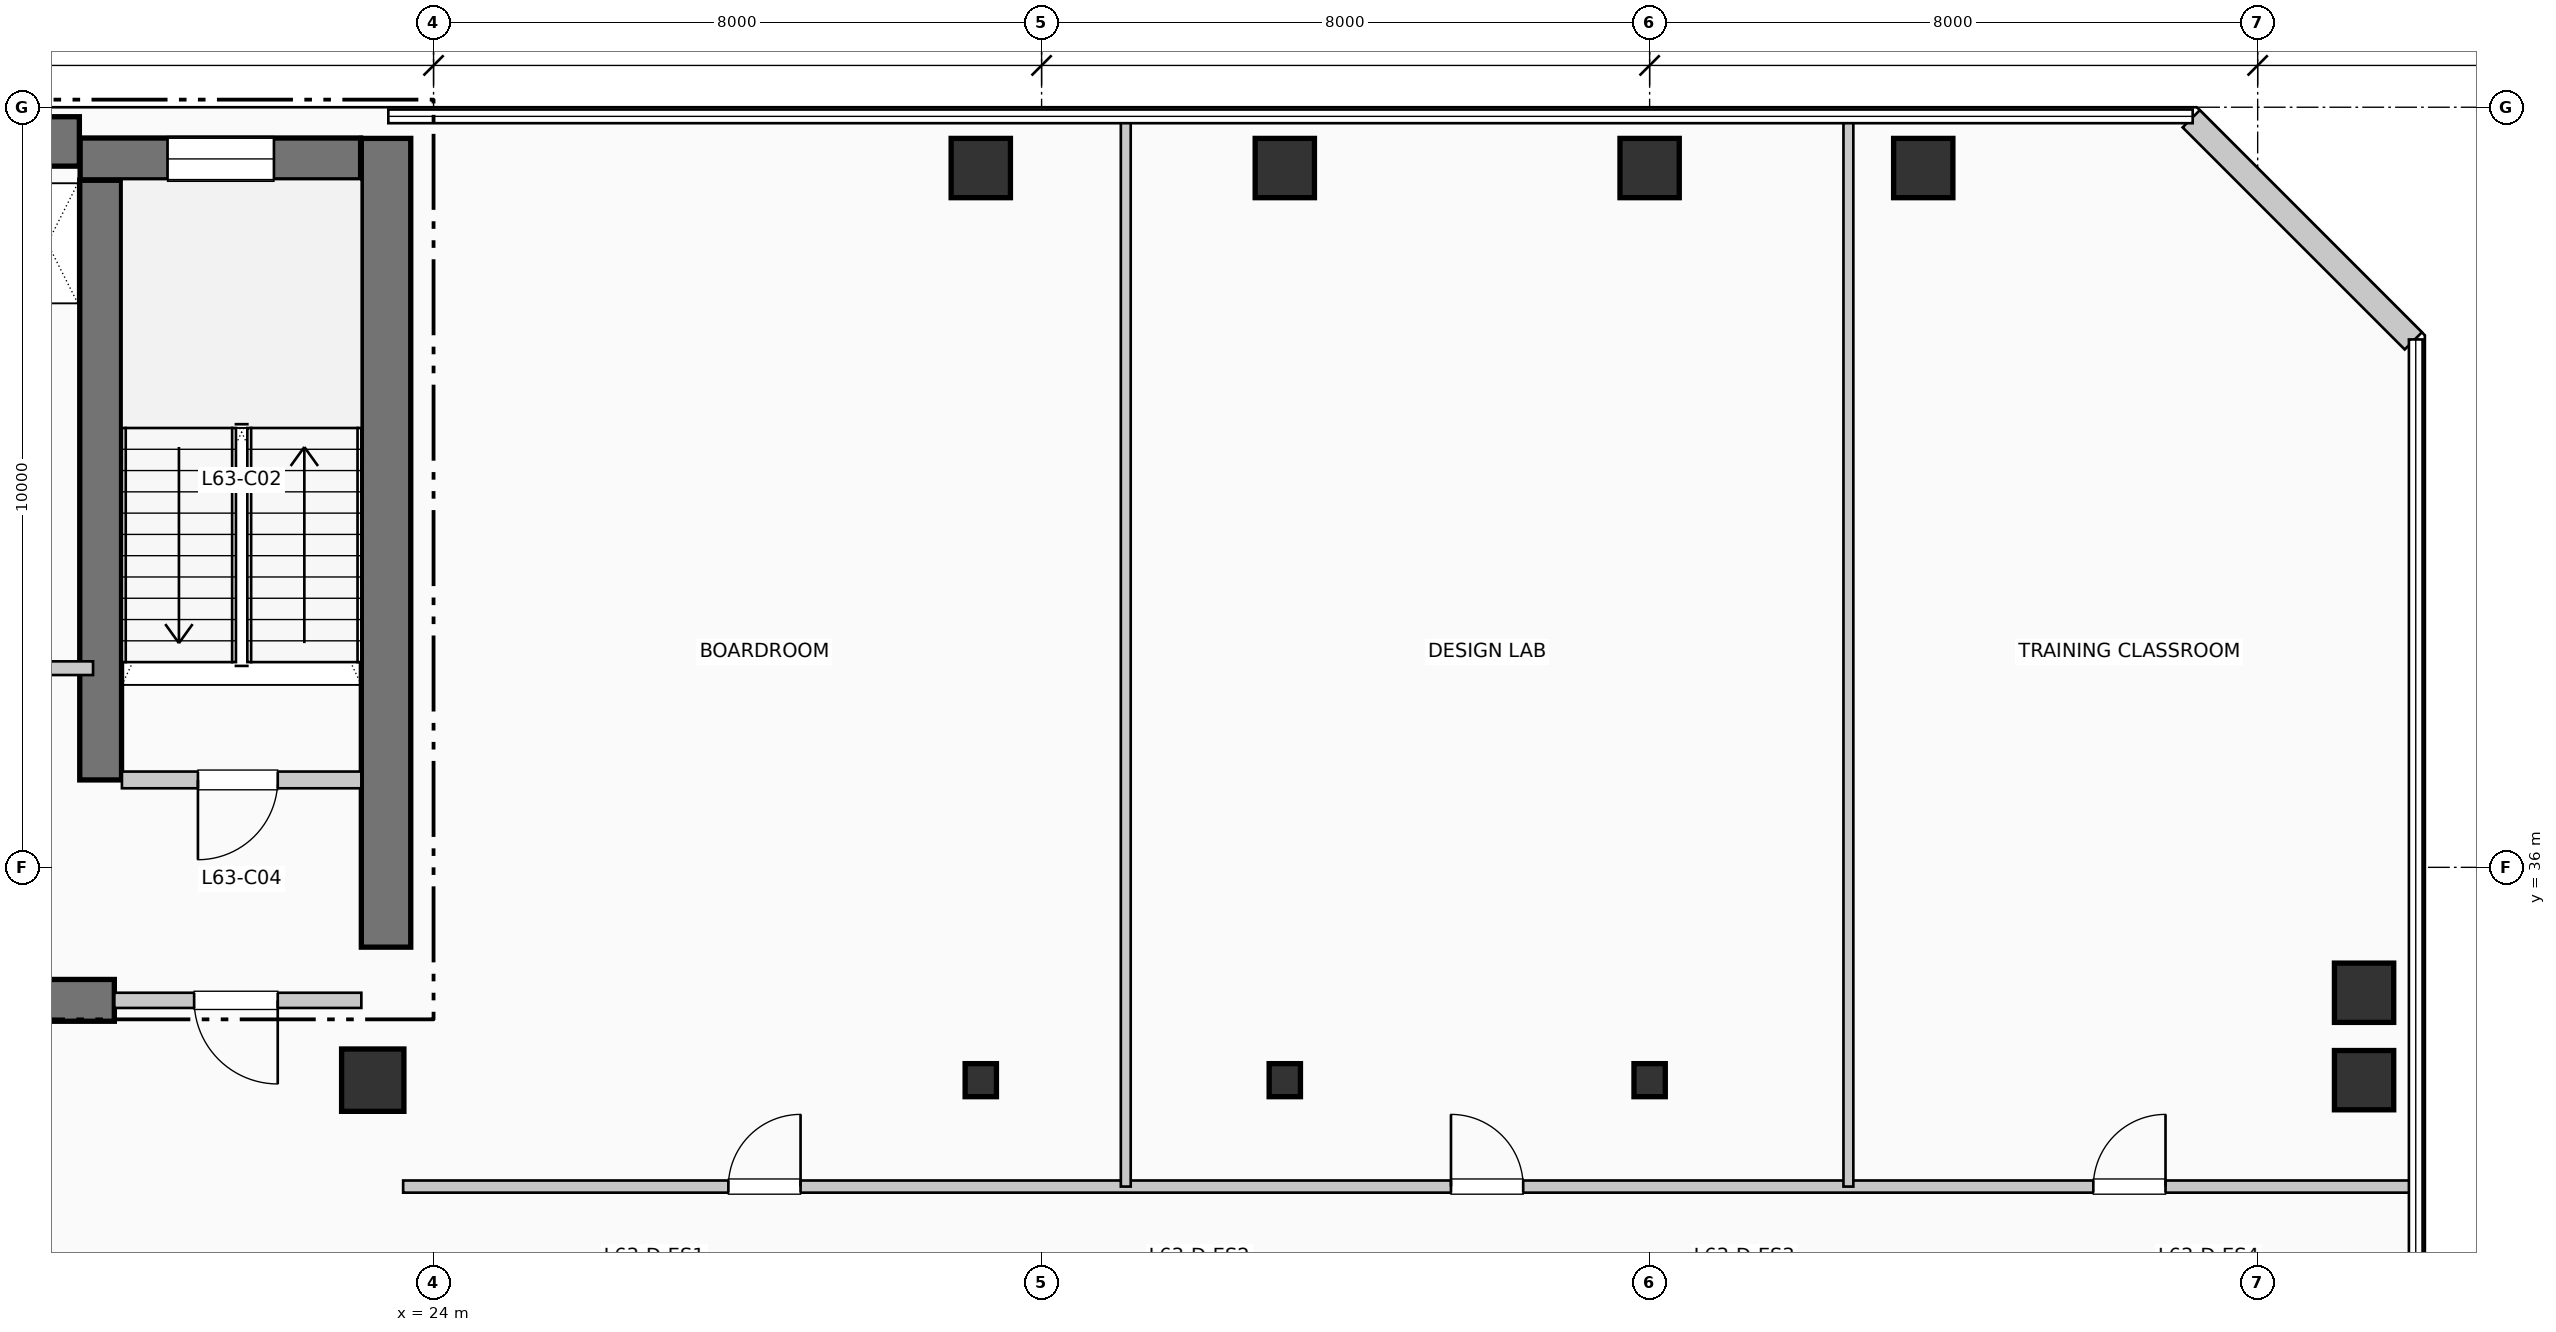
"""IFC4 building model, lengths in metres.
Left out: names, types, materials, properties, quantities, classifications, styles, units other than length and angle.
Written with IfcOpenShell. Run it as: python <this file> out.ifc"""

import sys

from ifc_helpers import new_model, si_unit, direction, frame, frame_2d, origin, origin_2d, place, context, subcontext, project, spatial, rectangle, i_section, extrude, element, fill, save


model = new_model("IFC4")
c1 = context("Model", 3, precision=1e-05, world=origin(), true_north=direction((0.0, 1.0)))
c2 = subcontext(c1, "Body", "Model", "MODEL_VIEW")
j1 = project(units=[si_unit("LENGTHUNIT", "METRE"), si_unit("PLANEANGLEUNIT", "RADIAN")], contexts=[c1])
p1 = place(None, origin())
s1 = spatial("IfcSite", under=j1, at=p1, CompositionType="ELEMENT")
p2 = place(p1, origin())
s2 = spatial("IfcBuilding", under=s1, at=p2, CompositionType="ELEMENT")
p3 = place(p2, frame((0.0, 0.0, 260.37)))
s3 = spatial("IfcBuildingStorey", under=s2, at=p3, CompositionType="ELEMENT", Elevation=260.37)
p4 = place(p3, frame((5.36, 45.55, 0.0), z_axis=(0.0, 0.0, 1.0), x_axis=(1.0, 0.0, 0.0)))
e1 = element("IfcWall", 1, at=p4, inside=s3, PredefinedType="SHEAR", context=c2, shape_type="SweptSolid", body=[
    extrude(rectangle(XDim=13.98, YDim=0.65, at=frame_2d((6.99, 0.0))), origin(), (0.0, 0.0, 1.0), 3.96),
])
p5 = place(p3, frame((23.375, 34.95, 0.0), z_axis=(0.0, 0.0, 1.0), x_axis=(0.0, 1.0, 0.0)))
e2 = element("IfcWall", 2, at=p5, inside=s3, PredefinedType="SHEAR", context=c2, shape_type="SweptSolid", body=[
    extrude(rectangle(XDim=10.64, YDim=0.65, at=frame_2d((5.32, 0.0))), origin(), (0.0, 0.0, 1.0), 3.96),
])
p6 = place(p3, frame((13.68, 34.25, 0.0), z_axis=(0.0, 0.0, 1.0), x_axis=(1.0, 0.0, 0.0)))
e3 = element("IfcWall", 3, at=p6, inside=s3, PredefinedType="SHEAR", context=c2, shape_type="SweptSolid", body=[
    extrude(rectangle(XDim=6.12, YDim=0.55, at=frame_2d((3.06, 0.0))), origin(), (0.0, 0.0, 1.0), 3.96),
])
p7 = place(p3, frame((19.62, 37.15, 0.0), z_axis=(0.0, 0.0, 1.0), x_axis=(0.0, 1.0, 0.0)))
e4 = element("IfcWall", 4, at=p7, inside=s3, PredefinedType="SHEAR", context=c2, shape_type="SweptSolid", body=[
    extrude(rectangle(XDim=7.89, YDim=0.55, at=frame_2d((3.945, 0.0))), origin(), (0.0, 0.0, 1.0), 3.96),
])
p8 = place(p3, frame((19.35, 45.32, 0.0), z_axis=(0.0, 0.0, 1.0), x_axis=(1.0, 0.0, 0.0)))
e5 = element("IfcWall", 5, at=p8, inside=s3, PredefinedType="SHEAR", context=c2, shape_type="SweptSolid", body=[
    extrude(rectangle(XDim=3.69, YDim=0.55, at=frame_2d((1.845, 0.0))), origin(), (0.0, 0.0, 1.0), 3.96),
])
p9 = place(p8, frame((1.15, 0.0, 1.05)))
e6 = element("IfcOpeningElement", 6, at=p9, cuts=e5, PredefinedType="OPENING", context=c2, shape_type="SweptSolid", body=[
    extrude(rectangle(XDim=1.4, YDim=1.8, at=frame_2d((0.7, 0.9))), frame((0.0, 0.285, 0.0), z_axis=(0.0, -1.0, 0.0), x_axis=(1.0, 0.0, 0.0)), (0.0, 0.0, 1.0), 0.57),
])
p10 = place(p3, frame((23.2, 33.2, 0.0), z_axis=(0.0, 0.0, 1.0), x_axis=(1.0, 0.0, 0.0)))
e7 = element("IfcColumn", 7, at=p10, inside=s3, PredefinedType="COLUMN", context=c2, shape_type="SweptSolid", body=[
    extrude(rectangle(XDim=0.82, YDim=0.82, at=origin_2d()), origin(), (0.0, 0.0, 1.0), 3.96),
])
p11 = place(p3, frame((31.2, 33.2, 0.0), z_axis=(0.0, 0.0, 1.0), x_axis=(1.0, 0.0, 0.0)))
e8 = element("IfcColumn", 8, at=p11, inside=s3, PredefinedType="COLUMN", context=c2, shape_type="SweptSolid", body=[
    extrude(i_section(OverallWidth=0.412, OverallDepth=0.435, WebThickness=0.027, FlangeThickness=0.043, at=origin_2d()), origin(), (0.0, 0.0, 1.0), 3.96),
])
p12 = place(p3, frame((31.2, 45.2, 0.0), z_axis=(0.0, 0.0, 1.0), x_axis=(1.0, 0.0, 0.0)))
e9 = element("IfcColumn", 9, at=p12, inside=s3, PredefinedType="COLUMN", context=c2, shape_type="SweptSolid", body=[
    extrude(rectangle(XDim=0.78, YDim=0.78, at=origin_2d()), origin(), (0.0, 0.0, 1.0), 3.96),
])
p13 = place(p3, frame((35.2, 33.2, 0.0), z_axis=(0.0, 0.0, 1.0), x_axis=(1.0, 0.0, 0.0)))
e10 = element("IfcColumn", 10, at=p13, inside=s3, PredefinedType="COLUMN", context=c2, shape_type="SweptSolid", body=[
    extrude(i_section(OverallWidth=0.412, OverallDepth=0.435, WebThickness=0.027, FlangeThickness=0.043, at=origin_2d()), origin(), (0.0, 0.0, 1.0), 3.96),
])
p14 = place(p3, frame((35.2, 45.2, 0.0), z_axis=(0.0, 0.0, 1.0), x_axis=(1.0, 0.0, 0.0)))
e11 = element("IfcColumn", 11, at=p14, inside=s3, PredefinedType="COLUMN", context=c2, shape_type="SweptSolid", body=[
    extrude(rectangle(XDim=0.78, YDim=0.78, at=origin_2d()), origin(), (0.0, 0.0, 1.0), 3.96),
])
p15 = place(p3, frame((40.0, 33.2, 0.0), z_axis=(0.0, 0.0, 1.0), x_axis=(1.0, 0.0, 0.0)))
e12 = element("IfcColumn", 12, at=p15, inside=s3, PredefinedType="COLUMN", context=c2, shape_type="SweptSolid", body=[
    extrude(i_section(OverallWidth=0.412, OverallDepth=0.435, WebThickness=0.027, FlangeThickness=0.043, at=origin_2d()), origin(), (0.0, 0.0, 1.0), 3.96),
])
for number, where, z_axis, x_axis in (
    (13, (40.0, 45.2, 0.0), (0.0, 0.0, 1.0), (1.0, 0.0, 0.0)),
    (14, (43.6, 45.2, 0.0), (0.0, 0.0, 1.0), (1.0, 0.0, 0.0)),
    (15, (49.4, 33.2, 0.0), (0.0, 0.0, 1.0), (1.0, 0.0, 0.0)),
    (16, (49.4, 34.35, 0.0), (0.0, 0.0, 1.0), (1.0, 0.0, 0.0)),
):
    element("IfcColumn", number, at=place(p3, frame(where, z_axis=z_axis, x_axis=x_axis)), inside=s3, PredefinedType="COLUMN", context=c2, shape_type="SweptSolid", body=[
        extrude(rectangle(XDim=0.78, YDim=0.78, at=origin_2d()), origin(), (0.0, 0.0, 1.0), 3.96),
    ])
p16 = place(p3, frame((50.048, 42.926, 0.0), z_axis=(0.0, 0.0, 1.0), x_axis=(-0.707136318428, 0.707077242712, 0.0)))
e17 = element("IfcWall", 17, at=p16, inside=s3, PredefinedType="SOLIDWALL", context=c2, shape_type="SweptSolid", body=[
    extrude(rectangle(XDim=4.133, YDim=0.32, at=frame_2d((2.066, 0.0))), origin(), (0.0, 0.0, 1.0), 3.71),
])
p17 = place(p3, frame((19.9, 37.15, 0.0), z_axis=(0.0, 0.0, 1.0), x_axis=(1.0, 0.0, 0.0)))
e18 = element("IfcWall", 18, at=p17, inside=s3, PredefinedType="PARTITIONING", context=c2, shape_type="SweptSolid", body=[
    extrude(rectangle(XDim=3.15, YDim=0.22, at=frame_2d((1.575, 0.0))), origin(), (0.0, 0.0, 1.0), 3.71),
])
p18 = place(p17, frame((2.05, 0.0, 0.0), z_axis=(0.0, 0.0, 1.0), x_axis=(-1.0, 0.0, 0.0)))
e19 = element("IfcOpeningElement", 19, at=p18, cuts=e18, PredefinedType="OPENING", context=c2, shape_type="SweptSolid", body=[
    extrude(rectangle(XDim=1.05, YDim=2.15, at=frame_2d((0.525, 1.075))), frame((0.0, 0.12, 0.0), z_axis=(0.0, -1.0, 0.0), x_axis=(1.0, 0.0, 0.0)), (0.0, 0.0, 1.0), 0.24),
])
p19 = place(p3, frame((19.8, 34.25, 0.0), z_axis=(0.0, 0.0, 1.0), x_axis=(1.0, 0.0, 0.0)))
e20 = element("IfcWall", 20, at=p19, inside=s3, PredefinedType="PARTITIONING", context=c2, shape_type="SweptSolid", body=[
    extrude(rectangle(XDim=3.25, YDim=0.2, at=frame_2d((1.625, 0.0))), origin(), (0.0, 0.0, 1.0), 3.71),
])
p20 = place(p19, frame((2.15, 0.0, 0.0), z_axis=(0.0, 0.0, 1.0), x_axis=(-1.0, 0.0, 0.0)))
e21 = element("IfcOpeningElement", 21, at=p20, cuts=e20, PredefinedType="OPENING", context=c2, shape_type="SweptSolid", body=[
    extrude(rectangle(XDim=1.1, YDim=2.15, at=frame_2d((0.55, 1.075))), frame((0.0, 0.11, 0.0), z_axis=(0.0, -1.0, 0.0), x_axis=(1.0, 0.0, 0.0)), (0.0, 0.0, 1.0), 0.22),
])
p21 = place(p3, frame((17.68, 38.62, 0.0), z_axis=(0.0, 0.0, 1.0), x_axis=(1.0, 0.0, 0.0)))
e22 = element("IfcWall", 22, at=p21, inside=s3, PredefinedType="PARTITIONING", context=c2, shape_type="SweptSolid", body=[
    extrude(rectangle(XDim=1.84, YDim=0.18, at=frame_2d((0.92, 0.0))), origin(), (0.0, 0.0, 1.0), 3.71),
])
p22 = place(p21, frame((0.24, 0.0, 0.0)))
e23 = element("IfcOpeningElement", 23, at=p22, cuts=e22, PredefinedType="OPENING", context=c2, shape_type="SweptSolid", body=[
    extrude(rectangle(XDim=0.92, YDim=2.1, at=frame_2d((0.46, 1.05))), frame((0.0, 0.1, 0.0), z_axis=(0.0, -1.0, 0.0), x_axis=(1.0, 0.0, 0.0)), (0.0, 0.0, 1.0), 0.2),
])
p23 = place(p3, frame((23.6, 31.8, 0.0), z_axis=(0.0, 0.0, 1.0), x_axis=(1.0, 0.0, 0.0)))
e24 = element("IfcWall", 24, at=p23, inside=s3, PredefinedType="PARTITIONING", context=c2, shape_type="SweptSolid", body=[
    extrude(rectangle(XDim=26.41, YDim=0.16, at=frame_2d((13.205, 0.0))), origin(), (0.0, 0.0, 1.0), 3.71),
])
p24 = place(p23, frame((4.279, 0.0, 0.0)))
e25 = element("IfcOpeningElement", 25, at=p24, cuts=e24, PredefinedType="OPENING", context=c2, shape_type="SweptSolid", body=[
    extrude(rectangle(XDim=0.95, YDim=2.15, at=frame_2d((0.475, 1.075))), frame((0.0, 0.09, 0.0), z_axis=(0.0, -1.0, 0.0), x_axis=(1.0, 0.0, 0.0)), (0.0, 0.0, 1.0), 0.18),
])
p25 = place(p23, frame((13.786, 0.0, 0.0)))
e26 = element("IfcOpeningElement", 26, at=p25, cuts=e24, PredefinedType="OPENING", context=c2, shape_type="SweptSolid", body=[
    extrude(rectangle(XDim=0.95, YDim=2.15, at=frame_2d((0.475, 1.075))), frame((0.0, 0.09, 0.0), z_axis=(0.0, -1.0, 0.0), x_axis=(1.0, 0.0, 0.0)), (0.0, 0.0, 1.0), 0.18),
])
p26 = place(p23, frame((22.238, 0.0, 0.0)))
e27 = element("IfcOpeningElement", 27, at=p26, cuts=e24, PredefinedType="OPENING", context=c2, shape_type="SweptSolid", body=[
    extrude(rectangle(XDim=0.95, YDim=2.15, at=frame_2d((0.475, 1.075))), frame((0.0, 0.09, 0.0), z_axis=(0.0, -1.0, 0.0), x_axis=(1.0, 0.0, 0.0)), (0.0, 0.0, 1.0), 0.18),
])
for number, where, z_axis, x_axis in (
    (28, (33.108, 31.8, 0.0), (0.0, 0.0, 1.0), (0.0, 1.0, 0.0)),
    (29, (42.615, 31.8, 0.0), (0.0, 0.0, 1.0), (0.0, 1.0, 0.0)),
):
    element("IfcWall", number, at=place(p3, frame(where, z_axis=z_axis, x_axis=x_axis)), inside=s3, PredefinedType="PARTITIONING", context=c2, shape_type="SweptSolid", body=[
        extrude(rectangle(XDim=14.01, YDim=0.13, at=frame_2d((7.005, 0.0))), origin(), (0.0, 0.0, 1.0), 3.71),
    ])
p27 = place(p9, origin())
e30 = element("IfcWindow", 30, at=p27, inside=s3, PartitioningType="SINGLE_PANEL", PredefinedType="WINDOW", context=c2, shape_type="SweptSolid", body=[
    extrude(rectangle(XDim=1.4, YDim=1.8, at=frame_2d((0.7, 0.9))), frame((0.0, 0.03, 0.0), z_axis=(0.0, -1.0, 0.0), x_axis=(1.0, 0.0, 0.0)), (0.0, 0.0, 1.0), 0.06),
])
fill(e6, e30)
p28 = place(p18, origin())
e31 = element("IfcDoor", 31, at=p28, inside=s3, OperationType="SINGLE_SWING_LEFT", PredefinedType="DOOR", context=c2, shape_type="SweptSolid", body=[
    extrude(rectangle(XDim=1.05, YDim=2.15, at=frame_2d((0.525, 1.075))), frame((0.0, 0.025, 0.0), z_axis=(0.0, -1.0, 0.0), x_axis=(1.0, 0.0, 0.0)), (0.0, 0.0, 1.0), 0.05),
])
fill(e19, e31)
p29 = place(p20, origin())
e32 = element("IfcDoor", 32, at=p29, inside=s3, OperationType="SINGLE_SWING_RIGHT", PredefinedType="DOOR", context=c2, shape_type="SweptSolid", body=[
    extrude(rectangle(XDim=1.1, YDim=2.15, at=frame_2d((0.55, 1.075))), frame((0.0, 0.025, 0.0), z_axis=(0.0, -1.0, 0.0), x_axis=(1.0, 0.0, 0.0)), (0.0, 0.0, 1.0), 0.05),
])
fill(e21, e32)
p30 = place(p24, origin())
e33 = element("IfcDoor", 33, at=p30, inside=s3, OperationType="SINGLE_SWING_RIGHT", PredefinedType="DOOR", context=c2, shape_type="SweptSolid", body=[
    extrude(rectangle(XDim=0.95, YDim=2.15, at=frame_2d((0.475, 1.075))), frame((0.0, 0.025, 0.0), z_axis=(0.0, -1.0, 0.0), x_axis=(1.0, 0.0, 0.0)), (0.0, 0.0, 1.0), 0.05),
])
fill(e25, e33)
p31 = place(p25, origin())
e34 = element("IfcDoor", 34, at=p31, inside=s3, OperationType="SINGLE_SWING_LEFT", PredefinedType="DOOR", context=c2, shape_type="SweptSolid", body=[
    extrude(rectangle(XDim=0.95, YDim=2.15, at=frame_2d((0.475, 1.075))), frame((0.0, 0.025, 0.0), z_axis=(0.0, -1.0, 0.0), x_axis=(1.0, 0.0, 0.0)), (0.0, 0.0, 1.0), 0.05),
])
fill(e26, e34)
p32 = place(p26, origin())
e35 = element("IfcDoor", 35, at=p32, inside=s3, OperationType="SINGLE_SWING_RIGHT", PredefinedType="DOOR", context=c2, shape_type="SweptSolid", body=[
    extrude(rectangle(XDim=0.95, YDim=2.15, at=frame_2d((0.475, 1.075))), frame((0.0, 0.025, 0.0), z_axis=(0.0, -1.0, 0.0), x_axis=(1.0, 0.0, 0.0)), (0.0, 0.0, 1.0), 0.05),
])
fill(e27, e35)
save(model, sys.argv[1])
